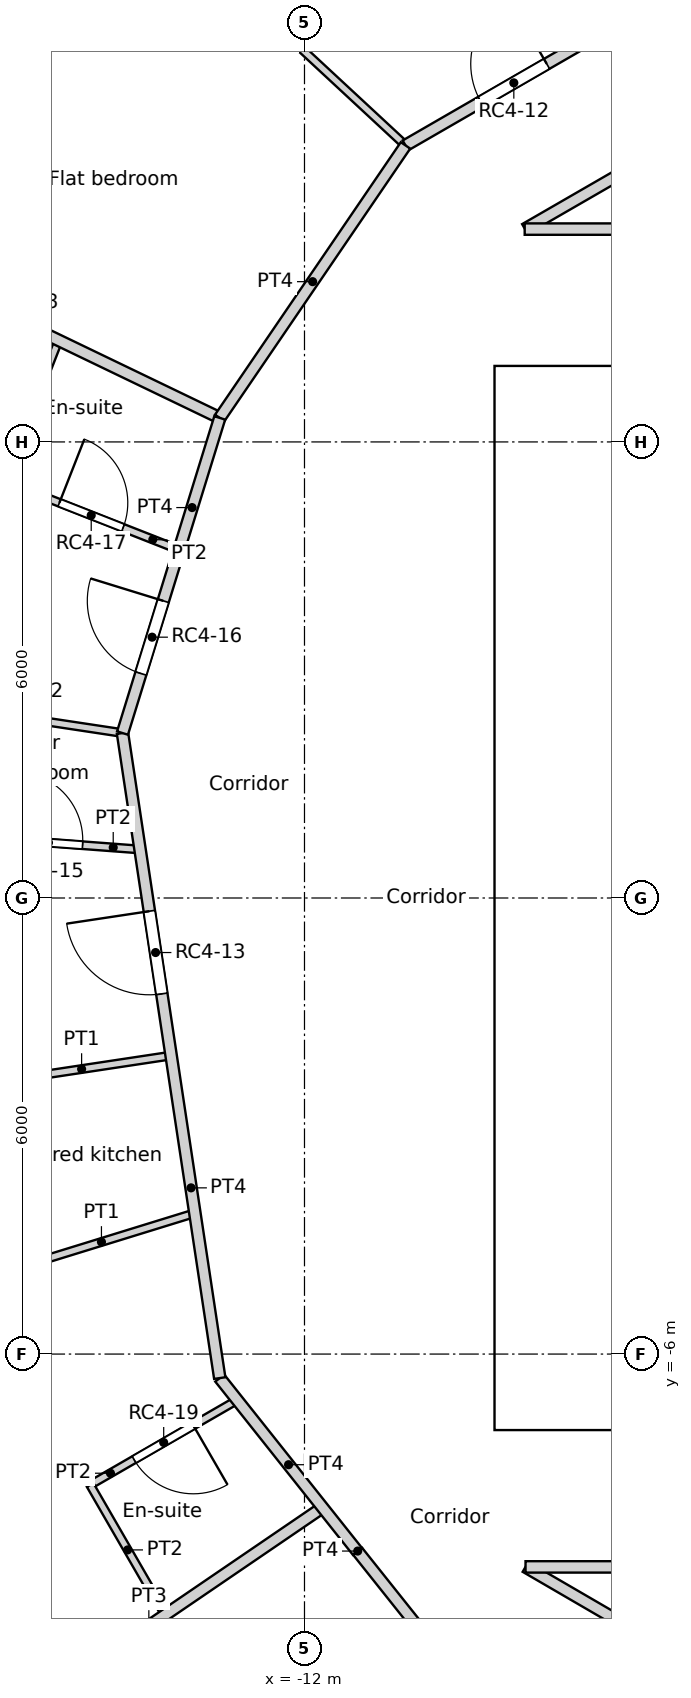
"""IFC4 building model, lengths in metres.
Left out: names, types, materials, properties, quantities, classifications, styles, units other than length and angle.
Written with IfcOpenShell. Run it as: python <this file> out.ifc"""

import sys

from ifc_helpers import new_model, si_unit, direction, frame, frame_2d, origin, place, context, subcontext, project, spatial, rectangle, extrude, element, fill, save


model = new_model("IFC4")
c1 = context("Model", 3, precision=1e-05, world=origin(), true_north=direction((0.0, 1.0)))
c2 = subcontext(c1, "Body", "Model", "MODEL_VIEW")
j1 = project(units=[si_unit("LENGTHUNIT", "METRE"), si_unit("PLANEANGLEUNIT", "RADIAN")], contexts=[c1])
p1 = place(None, origin())
s1 = spatial("IfcSite", under=j1, at=p1, CompositionType="ELEMENT")
p2 = place(p1, origin())
s2 = spatial("IfcBuilding", under=s1, at=p2, CompositionType="ELEMENT")
p3 = place(p2, frame((0.0, 0.0, 263.4)))
s3 = spatial("IfcBuildingStorey", under=s2, at=p3, CompositionType="ELEMENT", Elevation=263.4)
p4 = place(p3, frame((-9.5, -6.7, 0.0), z_axis=(0.0, 0.0, 1.0), x_axis=(1.0, 0.0, 0.0)))
e1 = element("IfcWall", 1, at=p4, inside=s3, PredefinedType="SOLIDWALL", context=c2, shape_type="SweptSolid", body=[
    extrude(rectangle(XDim=19.0, YDim=0.6, at=frame_2d((9.5, 0.0))), origin(), (0.0, 0.0, 1.0), 3.6),
])
p5 = place(p4, frame((10.4, 0.0, 0.0)))
e2 = element("IfcOpeningElement", 2, at=p5, cuts=e1, PredefinedType="OPENING", context=c2, shape_type="SweptSolid", body=[
    extrude(rectangle(XDim=1.0, YDim=2.1, at=frame_2d((0.5, 1.05))), frame((0.0, 0.3, 0.0), z_axis=(0.0, -1.0, 0.0), x_axis=(1.0, 0.0, 0.0)), (0.0, 0.0, 1.0), 0.6),
])
p6 = place(p4, frame((5.35, 0.0, 0.0)))
e3 = element("IfcOpeningElement", 3, at=p6, cuts=e1, PredefinedType="OPENING", context=c2, shape_type="SweptSolid", body=[
    extrude(rectangle(XDim=1.7, YDim=2.1, at=frame_2d((0.85, 1.05))), frame((0.0, 0.3, 0.0), z_axis=(0.0, -1.0, 0.0), x_axis=(1.0, 0.0, 0.0)), (0.0, 0.0, 1.0), 0.6),
])
p7 = place(p4, frame((11.95, 0.0, 0.0)))
e4 = element("IfcOpeningElement", 4, at=p7, cuts=e1, PredefinedType="OPENING", context=c2, shape_type="SweptSolid", body=[
    extrude(rectangle(XDim=1.7, YDim=2.1, at=frame_2d((0.85, 1.05))), frame((0.0, 0.3, 0.0), z_axis=(0.0, -1.0, 0.0), x_axis=(1.0, 0.0, 0.0)), (0.0, 0.0, 1.0), 0.6),
])
p8 = place(p3, frame((-9.5, 6.7, 0.0), z_axis=(0.0, 0.0, 1.0), x_axis=(1.0, 0.0, 0.0)))
e5 = element("IfcWall", 5, at=p8, inside=s3, PredefinedType="SOLIDWALL", context=c2, shape_type="SweptSolid", body=[
    extrude(rectangle(XDim=19.0, YDim=0.6, at=frame_2d((9.5, 0.0))), origin(), (0.0, 0.0, 1.0), 3.6),
])
p9 = place(p8, frame((5.35, 0.0, 0.0)))
e6 = element("IfcOpeningElement", 6, at=p9, cuts=e5, PredefinedType="OPENING", context=c2, shape_type="SweptSolid", body=[
    extrude(rectangle(XDim=1.7, YDim=2.1, at=frame_2d((0.85, 1.05))), frame((0.0, 0.3, 0.0), z_axis=(0.0, -1.0, 0.0), x_axis=(1.0, 0.0, 0.0)), (0.0, 0.0, 1.0), 0.6),
])
p10 = place(p3, frame((-9.2, -6.4, 0.0), z_axis=(0.0, 0.0, 1.0), x_axis=(0.0, 1.0, 0.0)))
e7 = element("IfcWall", 7, at=p10, inside=s3, PredefinedType="SOLIDWALL", context=c2, shape_type="SweptSolid", body=[
    extrude(rectangle(XDim=12.8, YDim=0.6, at=frame_2d((6.4, 0.0))), origin(), (0.0, 0.0, 1.0), 3.6),
])
p11 = place(p3, frame((-8.9, -3.1, 0.0), z_axis=(0.0, 0.0, 1.0), x_axis=(1.0, 0.0, 0.0)))
e8 = element("IfcWall", 8, at=p11, inside=s3, PredefinedType="SOLIDWALL", context=c2, shape_type="SweptSolid", body=[
    extrude(rectangle(XDim=9.6, YDim=0.3, at=frame_2d((4.8, 0.0))), origin(), (0.0, 0.0, 1.0), 3.25),
])
p12 = place(p11, frame((4.75, 0.0, 0.0)))
e9 = element("IfcOpeningElement", 9, at=p12, cuts=e8, PredefinedType="OPENING", context=c2, shape_type="SweptSolid", body=[
    extrude(rectangle(XDim=1.7, YDim=2.1, at=frame_2d((0.85, 1.05))), frame((0.0, 0.15, 0.0), z_axis=(0.0, -1.0, 0.0), x_axis=(1.0, 0.0, 0.0)), (0.0, 0.0, 1.0), 0.3),
])
p13 = place(p3, frame((-8.9, 3.1, 0.0), z_axis=(0.0, 0.0, 1.0), x_axis=(1.0, 0.0, 0.0)))
e10 = element("IfcWall", 10, at=p13, inside=s3, PredefinedType="SOLIDWALL", context=c2, shape_type="SweptSolid", body=[
    extrude(rectangle(XDim=4.55, YDim=0.3, at=frame_2d((2.275, 0.0))), origin(), (0.0, 0.0, 1.0), 3.25),
])
p14 = place(p3, frame((-8.9, 0.0, 0.0), z_axis=(0.0, 0.0, 1.0), x_axis=(1.0, 0.0, 0.0)))
e11 = element("IfcWall", 11, at=p14, inside=s3, PredefinedType="SOLIDWALL", context=c2, shape_type="SweptSolid", body=[
    extrude(rectangle(XDim=3.0, YDim=0.3, at=frame_2d((1.5, 0.0))), origin(), (0.0, 0.0, 1.0), 3.25),
])
p15 = place(p3, frame((-9.103, 8.8, 0.0), z_axis=(0.0, 0.0, 1.0), x_axis=(1.0, 0.0, 0.0)))
e12 = element("IfcWall", 12, at=p15, inside=s3, PredefinedType="PARTITIONING", context=c2, shape_type="SweptSolid", body=[
    extrude(rectangle(XDim=9.663, YDim=0.15, at=frame_2d((4.832, 0.0))), origin(), (0.0, 0.0, 1.0), 3.25),
])
p16 = place(p15, frame((4.332, 0.0, 0.0)))
e13 = element("IfcOpeningElement", 13, at=p16, cuts=e12, PredefinedType="OPENING", context=c2, shape_type="SweptSolid", body=[
    extrude(rectangle(XDim=1.0, YDim=2.04, at=frame_2d((0.5, 1.02))), frame((0.0, 0.075, 0.0), z_axis=(0.0, -1.0, 0.0), x_axis=(1.0, 0.0, 0.0)), (0.0, 0.0, 1.0), 0.15),
])
p17 = place(p3, frame((-9.092, -8.8, 0.0), z_axis=(0.0, 0.0, 1.0), x_axis=(1.0, 0.0, 0.0)))
e14 = element("IfcWall", 14, at=p17, inside=s3, PredefinedType="PARTITIONING", context=c2, shape_type="SweptSolid", body=[
    extrude(rectangle(XDim=18.193, YDim=0.15, at=frame_2d((9.096, 0.0))), origin(), (0.0, 0.0, 1.0), 3.25),
])
p18 = place(p17, frame((8.592, 0.0, 0.0)))
e15 = element("IfcOpeningElement", 15, at=p18, cuts=e14, PredefinedType="OPENING", context=c2, shape_type="SweptSolid", body=[
    extrude(rectangle(XDim=1.0, YDim=2.04, at=frame_2d((0.5, 1.02))), frame((0.0, 0.075, 0.0), z_axis=(0.0, -1.0, 0.0), x_axis=(1.0, 0.0, 0.0)), (0.0, 0.0, 1.0), 0.15),
])
p19 = place(p3, frame((-9.092, -8.8, 0.0), z_axis=(0.0, 0.0, 1.0), x_axis=(0.864470922103, -0.502682827277, 0.0)))
e16 = element("IfcWall", 16, at=p19, inside=s3, PredefinedType="PARTITIONING", context=c2, shape_type="SweptSolid", body=[
    extrude(rectangle(XDim=6.735, YDim=0.15, at=frame_2d((3.368, 0.0))), origin(), (0.0, 0.0, 1.0), 3.25),
])
p20 = place(p3, frame((-11.3, -8.596, 0.0), z_axis=(0.0, 0.0, 1.0), x_axis=(0.623165080354, -0.782090328944, 0.0)))
e17 = element("IfcWall", 17, at=p20, inside=s3, PredefinedType="PARTITIONING", context=c2, shape_type="SweptSolid", body=[
    extrude(rectangle(XDim=3.564, YDim=0.15, at=frame_2d((1.782, 0.0))), origin(), (0.0, 0.0, 1.0), 3.25),
])
p21 = place(p3, frame((-11.3, -8.596, 0.0), z_axis=(0.0, 0.0, 1.0), x_axis=(0.0, 1.0, 0.0)))
e18 = element("IfcWall", 18, at=p21, inside=s3, PredefinedType="PARTITIONING", context=c2, shape_type="SweptSolid", body=[
    extrude(rectangle(XDim=0.009, YDim=0.15, at=frame_2d((0.005, 0.0))), origin(), (0.0, 0.0, 1.0), 3.25),
])
p22 = place(p3, frame((-9.099, 8.801, 0.0), z_axis=(0.0, 0.0, 1.0), x_axis=(0.866068593998, 0.499925184894, 0.0)))
e19 = element("IfcWall", 19, at=p22, inside=s3, PredefinedType="PARTITIONING", context=c2, shape_type="SweptSolid", body=[
    extrude(rectangle(XDim=6.741, YDim=0.15, at=frame_2d((3.371, 0.0))), origin(), (0.0, 0.0, 1.0), 3.25),
])
p23 = place(p3, frame((-10.671, 9.901, 0.0), z_axis=(0.0, 0.0, 1.0), x_axis=(0.866021669971, 0.500006467099, 0.0)))
e20 = element("IfcWall", 20, at=p23, inside=s3, PredefinedType="PARTITIONING", context=c2, shape_type="SweptSolid", body=[
    extrude(rectangle(XDim=8.582, YDim=0.15, at=frame_2d((4.291, 0.0))), origin(), (0.0, 0.0, 1.0), 3.25),
])
p24 = place(p23, frame((1.146, 0.0, 0.0)))
e21 = element("IfcOpeningElement", 21, at=p24, cuts=e20, PredefinedType="OPENING", context=c2, shape_type="SweptSolid", body=[
    extrude(rectangle(XDim=1.0, YDim=2.1, at=frame_2d((0.5, 1.05))), frame((0.0, 0.075, 0.0), z_axis=(0.0, -1.0, 0.0), x_axis=(1.0, 0.0, 0.0)), (0.0, 0.0, 1.0), 0.15),
])
p25 = place(p3, frame((-13.115, 6.316, 0.0), z_axis=(0.0, 0.0, 1.0), x_axis=(0.563305396331, 0.826248770325, 0.0)))
e22 = element("IfcWall", 22, at=p25, inside=s3, PredefinedType="PARTITIONING", context=c2, shape_type="SweptSolid", body=[
    extrude(rectangle(XDim=4.339, YDim=0.15, at=frame_2d((2.169, 0.0))), origin(), (0.0, 0.0, 1.0), 3.25),
])
p26 = place(p3, frame((-14.394, 2.17, 0.0), z_axis=(0.0, 0.0, 1.0), x_axis=(0.149099970299, -0.988822127006, 0.0)))
e23 = element("IfcWall", 23, at=p26, inside=s3, PredefinedType="PARTITIONING", context=c2, shape_type="SweptSolid", body=[
    extrude(rectangle(XDim=8.582, YDim=0.15, at=frame_2d((4.291, 0.0))), origin(), (0.0, 0.0, 1.0), 3.25),
])
p27 = place(p26, frame((2.37, 0.0, 0.0)))
e24 = element("IfcOpeningElement", 24, at=p27, cuts=e23, PredefinedType="OPENING", context=c2, shape_type="SweptSolid", body=[
    extrude(rectangle(XDim=1.1, YDim=2.1, at=frame_2d((0.55, 1.05))), frame((0.0, 0.075, 0.0), z_axis=(0.0, -1.0, 0.0), x_axis=(1.0, 0.0, 0.0)), (0.0, 0.0, 1.0), 0.15),
])
p28 = place(p3, frame((-14.394, 2.17, 0.0), z_axis=(0.0, 0.0, 1.0), x_axis=(0.294793541578, 0.955560970239, 0.0)))
e25 = element("IfcWall", 25, at=p28, inside=s3, PredefinedType="PARTITIONING", context=c2, shape_type="SweptSolid", body=[
    extrude(rectangle(XDim=4.339, YDim=0.15, at=frame_2d((2.169, 0.0))), origin(), (0.0, 0.0, 1.0), 3.25),
])
p29 = place(p28, frame((0.82, 0.0, 0.0)))
e26 = element("IfcOpeningElement", 26, at=p29, cuts=e25, PredefinedType="OPENING", context=c2, shape_type="SweptSolid", body=[
    extrude(rectangle(XDim=1.0, YDim=2.1, at=frame_2d((0.5, 1.05))), frame((0.0, 0.075, 0.0), z_axis=(0.0, -1.0, 0.0), x_axis=(1.0, 0.0, 0.0)), (0.0, 0.0, 1.0), 0.15),
])
p30 = place(p3, frame((-13.115, -6.316, 0.0), z_axis=(0.0, 0.0, 1.0), x_axis=(0.622042479172, -0.782983495423, 0.0)))
e27 = element("IfcWall", 27, at=p30, inside=s3, PredefinedType="PARTITIONING", context=c2, shape_type="SweptSolid", body=[
    extrude(rectangle(XDim=2.911, YDim=0.15, at=frame_2d((1.456, 0.0))), origin(), (0.0, 0.0, 1.0), 3.25),
])
p31 = place(p3, frame((-14.493, 13.448, 0.0), z_axis=(0.0, 0.0, 1.0), x_axis=(0.732975231717, -0.680255326836, 0.0)))
e28 = element("IfcWall", 28, at=p31, inside=s3, PredefinedType="PARTITIONING", context=c2, shape_type="SweptSolid", body=[
    extrude(rectangle(XDim=5.214, YDim=0.1, at=frame_2d((2.607, 0.0))), origin(), (0.0, 0.0, 1.0), 3.25),
])
p32 = place(p31, frame((2.157, 0.0, 0.0)))
e29 = element("IfcOpeningElement", 29, at=p32, cuts=e28, PredefinedType="OPENING", context=c2, shape_type="SweptSolid", body=[
    extrude(rectangle(XDim=0.9, YDim=2.1, at=frame_2d((0.45, 1.05))), frame((0.0, 0.05, 0.0), z_axis=(0.0, -1.0, 0.0), x_axis=(1.0, 0.0, 0.0)), (0.0, 0.0, 1.0), 0.1),
])
p33 = place(p3, frame((-17.813, 8.578, 0.0), z_axis=(0.0, 0.0, 1.0), x_axis=(0.901040981828, -0.433733961164, 0.0)))
e30 = element("IfcWall", 30, at=p33, inside=s3, PredefinedType="PARTITIONING", context=c2, shape_type="SweptSolid", body=[
    extrude(rectangle(XDim=5.214, YDim=0.15, at=frame_2d((2.607, 0.0))), origin(), (0.0, 0.0, 1.0), 3.25),
])
p34 = place(p3, frame((-19.551, -2.947, 0.0), z_axis=(0.0, 0.0, 1.0), x_axis=(0.988820879867, 0.149108241014, 0.0)))
e31 = element("IfcWall", 31, at=p34, inside=s3, PredefinedType="PARTITIONING", context=c2, shape_type="SweptSolid", body=[
    extrude(rectangle(XDim=5.862, YDim=0.1, at=frame_2d((2.931, 0.0))), origin(), (0.0, 0.0, 1.0), 3.25),
])
p35 = place(p34, frame((2.43, 0.0, 0.0)))
e32 = element("IfcOpeningElement", 32, at=p35, cuts=e31, PredefinedType="OPENING", context=c2, shape_type="SweptSolid", body=[
    extrude(rectangle(XDim=1.0, YDim=2.04, at=frame_2d((0.5, 1.02))), frame((0.0, 0.05, 0.0), z_axis=(0.0, -1.0, 0.0), x_axis=(1.0, 0.0, 0.0)), (0.0, 0.0, 1.0), 0.1),
])
p36 = place(p3, frame((-16.573, 0.818, 0.0), z_axis=(0.0, 0.0, 1.0), x_axis=(0.997216800215, -0.074556377121, 0.0)))
e33 = element("IfcWall", 33, at=p36, inside=s3, PredefinedType="PARTITIONING", context=c2, shape_type="SweptSolid", body=[
    extrude(rectangle(XDim=2.417, YDim=0.1, at=frame_2d((1.208, 0.0))), origin(), (0.0, 0.0, 1.0), 3.25),
])
p37 = place(p36, frame((0.758, 0.0, 0.0)))
e34 = element("IfcOpeningElement", 34, at=p37, cuts=e33, PredefinedType="OPENING", context=c2, shape_type="SweptSolid", body=[
    extrude(rectangle(XDim=0.9, YDim=2.0, at=frame_2d((0.45, 1.0))), frame((0.0, 0.05, 0.0), z_axis=(0.0, -1.0, 0.0), x_axis=(1.0, 0.0, 0.0)), (0.0, 0.0, 1.0), 0.1),
])
p38 = place(p3, frame((-18.893, -5.828, 0.0), z_axis=(0.0, 0.0, 1.0), x_axis=(0.955552020905, 0.294822548908, 0.0)))
e35 = element("IfcWall", 35, at=p38, inside=s3, PredefinedType="PARTITIONING", context=c2, shape_type="SweptSolid", body=[
    extrude(rectangle(XDim=5.705, YDim=0.1, at=frame_2d((2.853, 0.0))), origin(), (0.0, 0.0, 1.0), 3.25),
])
p39 = place(p38, frame((2.182, 0.0, 0.0)))
e36 = element("IfcOpeningElement", 36, at=p39, cuts=e35, PredefinedType="OPENING", context=c2, shape_type="SweptSolid", body=[
    extrude(rectangle(XDim=0.9, YDim=2.1, at=frame_2d((0.45, 1.05))), frame((0.0, 0.05, 0.0), z_axis=(0.0, -1.0, 0.0), x_axis=(1.0, 0.0, 0.0)), (0.0, 0.0, 1.0), 0.1),
])
p40 = place(p3, frame((-16.449, 2.48, 0.0), z_axis=(0.0, 0.0, 1.0), x_axis=(0.988807590235, -0.149196345444, 0.0)))
e37 = element("IfcWall", 37, at=p40, inside=s3, PredefinedType="PARTITIONING", context=c2, shape_type="SweptSolid", body=[
    extrude(rectangle(XDim=2.078, YDim=0.1, at=frame_2d((1.039, 0.0))), origin(), (0.0, 0.0, 1.0), 3.25),
])
p41 = place(p3, frame((-15.961, 5.488, 0.0), z_axis=(0.0, 0.0, 1.0), x_axis=(0.365427989951, 0.930839612479, 0.0)))
e38 = element("IfcWall", 38, at=p41, inside=s3, PredefinedType="PARTITIONING", context=c2, shape_type="SweptSolid", body=[
    extrude(rectangle(XDim=1.986, YDim=0.1, at=frame_2d((0.993, 0.0))), origin(), (0.0, 0.0, 1.0), 3.25),
])
p42 = place(p3, frame((-15.961, 5.488, 0.0), z_axis=(0.0, 0.0, 1.0), x_axis=(0.930878137474, -0.365329841614, 0.0)))
e39 = element("IfcWall", 39, at=p42, inside=s3, PredefinedType="PARTITIONING", context=c2, shape_type="SweptSolid", body=[
    extrude(rectangle(XDim=2.483, YDim=0.1, at=frame_2d((1.241, 0.0))), origin(), (0.0, 0.0, 1.0), 3.25),
])
p43 = place(p42, frame((0.791, 0.0, 0.0)))
e40 = element("IfcOpeningElement", 40, at=p43, cuts=e39, PredefinedType="OPENING", context=c2, shape_type="SweptSolid", body=[
    extrude(rectangle(XDim=0.9, YDim=2.04, at=frame_2d((0.45, 1.02))), frame((0.0, 0.05, 0.0), z_axis=(0.0, -1.0, 0.0), x_axis=(1.0, 0.0, 0.0)), (0.0, 0.0, 1.0), 0.1),
])
p44 = place(p3, frame((-14.82, -7.722, 0.0), z_axis=(0.0, 0.0, 1.0), x_axis=(0.866076416361, 0.499911633214, 0.0)))
e41 = element("IfcWall", 41, at=p44, inside=s3, PredefinedType="PARTITIONING", context=c2, shape_type="SweptSolid", body=[
    extrude(rectangle(XDim=2.234, YDim=0.1, at=frame_2d((1.117, 0.0))), origin(), (0.0, 0.0, 1.0), 3.25),
])
p45 = place(p44, frame((0.667, 0.0, 0.0)))
e42 = element("IfcOpeningElement", 42, at=p45, cuts=e41, PredefinedType="OPENING", context=c2, shape_type="SweptSolid", body=[
    extrude(rectangle(XDim=0.9, YDim=2.04, at=frame_2d((0.45, 1.02))), frame((0.0, 0.05, 0.0), z_axis=(0.0, -1.0, 0.0), x_axis=(1.0, 0.0, 0.0)), (0.0, 0.0, 1.0), 0.1),
])
p46 = place(p3, frame((-14.82, -7.722, 0.0), z_axis=(0.0, 0.0, 1.0), x_axis=(0.500143626598, -0.865942465048, 0.0)))
e43 = element("IfcWall", 43, at=p46, inside=s3, PredefinedType="PARTITIONING", context=c2, shape_type="SweptSolid", body=[
    extrude(rectangle(XDim=1.974, YDim=0.1, at=frame_2d((0.987, 0.0))), origin(), (0.0, 0.0, 1.0), 3.25),
])
p47 = place(p3, frame((-16.336, -11.138, 0.0), z_axis=(0.0, 0.0, 1.0), x_axis=(0.82615274451, 0.563446219917, 0.0)))
e44 = element("IfcWall", 44, at=p47, inside=s3, PredefinedType="PARTITIONING", context=c2, shape_type="SweptSolid", body=[
    extrude(rectangle(XDim=5.54, YDim=0.15, at=frame_2d((2.77, 0.0))), origin(), (0.0, 0.0, 1.0), 3.25),
])
p48 = place(p24, origin())
e45 = element("IfcDoor", 45, at=p48, inside=s3, OperationType="SINGLE_SWING_RIGHT", PredefinedType="DOOR", context=c2, shape_type="SweptSolid", body=[
    extrude(rectangle(XDim=1.0, YDim=2.1, at=frame_2d((0.5, 1.05))), frame((0.0, 0.025, 0.0), z_axis=(0.0, -1.0, 0.0), x_axis=(1.0, 0.0, 0.0)), (0.0, 0.0, 1.0), 0.05),
])
fill(e21, e45)
p49 = place(p27, origin())
e46 = element("IfcDoor", 46, at=p49, inside=s3, OperationType="SINGLE_SWING_RIGHT", PredefinedType="DOOR", context=c2, shape_type="SweptSolid", body=[
    extrude(rectangle(XDim=1.1, YDim=2.1, at=frame_2d((0.55, 1.05))), frame((0.0, 0.025, 0.0), z_axis=(0.0, -1.0, 0.0), x_axis=(1.0, 0.0, 0.0)), (0.0, 0.0, 1.0), 0.05),
])
fill(e24, e46)
p50 = place(p37, origin())
e47 = element("IfcDoor", 47, at=p50, inside=s3, OperationType="SINGLE_SWING_LEFT", PredefinedType="DOOR", context=c2, shape_type="SweptSolid", body=[
    extrude(rectangle(XDim=0.9, YDim=2.0, at=frame_2d((0.45, 1.0))), frame((0.0, 0.025, 0.0), z_axis=(0.0, -1.0, 0.0), x_axis=(1.0, 0.0, 0.0)), (0.0, 0.0, 1.0), 0.05),
])
fill(e34, e47)
p51 = place(p29, origin())
e48 = element("IfcDoor", 48, at=p51, inside=s3, OperationType="SINGLE_SWING_RIGHT", PredefinedType="DOOR", context=c2, shape_type="SweptSolid", body=[
    extrude(rectangle(XDim=1.0, YDim=2.1, at=frame_2d((0.5, 1.05))), frame((0.0, 0.025, 0.0), z_axis=(0.0, -1.0, 0.0), x_axis=(1.0, 0.0, 0.0)), (0.0, 0.0, 1.0), 0.05),
])
fill(e26, e48)
p52 = place(p43, origin())
e49 = element("IfcDoor", 49, at=p52, inside=s3, OperationType="SINGLE_SWING_LEFT", PredefinedType="DOOR", context=c2, shape_type="SweptSolid", body=[
    extrude(rectangle(XDim=0.9, YDim=2.04, at=frame_2d((0.45, 1.02))), frame((0.0, 0.025, 0.0), z_axis=(0.0, -1.0, 0.0), x_axis=(1.0, 0.0, 0.0)), (0.0, 0.0, 1.0), 0.05),
])
fill(e40, e49)
p53 = place(p45, origin())
e50 = element("IfcDoor", 50, at=p53, inside=s3, OperationType="SINGLE_SWING_LEFT", PredefinedType="DOOR", context=c2, shape_type="SweptSolid", body=[
    extrude(rectangle(XDim=0.9, YDim=2.04, at=frame_2d((0.45, 1.02))), frame((0.0, 0.025, 0.0), z_axis=(0.0, -1.0, 0.0), x_axis=(1.0, 0.0, 0.0)), (0.0, 0.0, 1.0), 0.05),
])
fill(e42, e50)
save(model, sys.argv[1])
